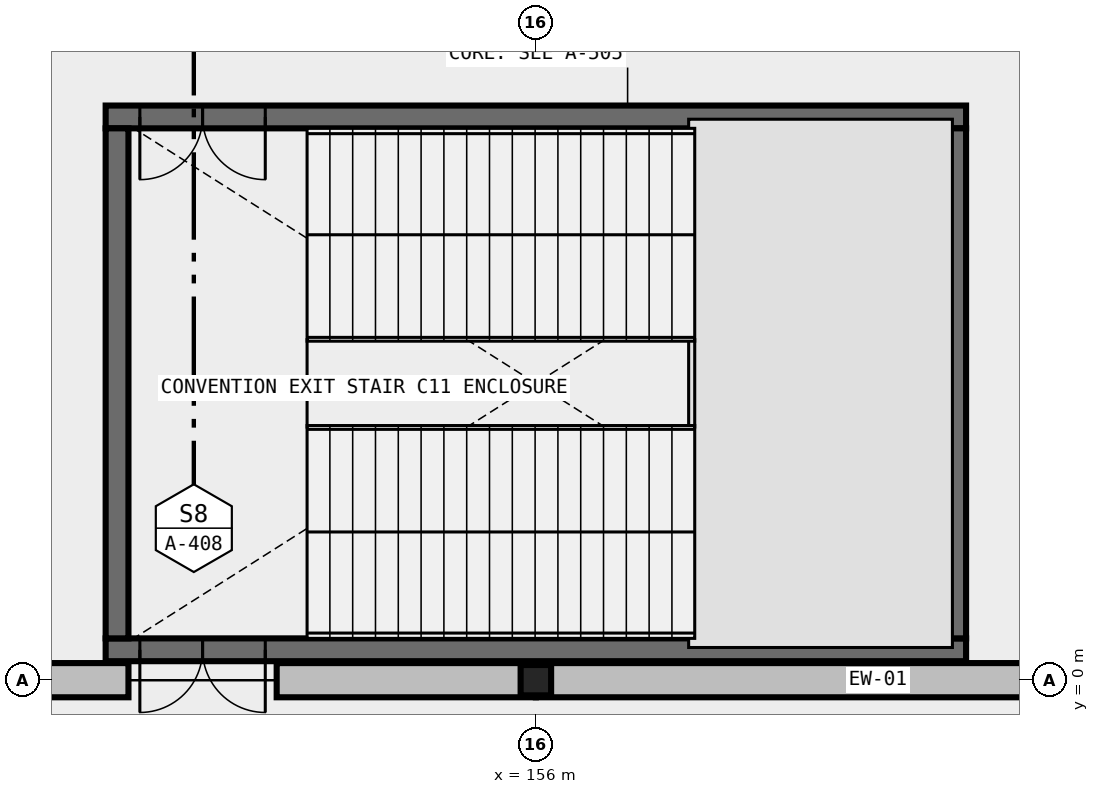
"""IFC4 building model, lengths in metres.
Left out: names, types, materials, properties, quantities, classifications, styles, units other than length and angle.
Written with IfcOpenShell. Run it as: python <this file> out.ifc"""

import sys

from ifc_helpers import new_model, si_unit, direction, frame, frame_2d, origin, origin_2d, place, context, subcontext, project, spatial, rectangle, i_section, extrude, element, fill, save


model = new_model("IFC4")
c1 = context("Model", 3, precision=1e-05, world=origin(), true_north=direction((0.0, 1.0)))
c2 = subcontext(c1, "Body", "Model", "MODEL_VIEW")
j1 = project(units=[si_unit("LENGTHUNIT", "METRE"), si_unit("PLANEANGLEUNIT", "RADIAN")], contexts=[c1])
p1 = place(None, origin())
s1 = spatial("IfcSite", under=j1, at=p1, CompositionType="ELEMENT")
p2 = place(p1, origin())
s2 = spatial("IfcBuilding", under=s1, at=p2, CompositionType="ELEMENT")
p3 = place(p2, origin())
s3 = spatial("IfcBuildingStorey", under=s2, at=p3, CompositionType="ELEMENT", Elevation=0.0)
p4 = place(p3, frame((156.0, 0.0, 0.0), z_axis=(0.0, 0.0, 1.0), x_axis=(1.0, 0.0, 0.0)))
e1 = element("IfcColumn", 1, at=p4, inside=s3, PredefinedType="COLUMN", context=c2, shape_type="SweptSolid", body=[
    extrude(i_section(OverallWidth=0.401, OverallDepth=0.399, WebThickness=0.025, FlangeThickness=0.04, FilletRadius=0.031, at=origin_2d()), origin(), (0.0, 0.0, 1.0), 6.0),
])
p5 = place(p3, frame((161.66, 0.4, 0.0), z_axis=(0.0, 0.0, 1.0), x_axis=(-1.0, 0.0, 0.0)))
e2 = element("IfcWall", 2, at=p5, inside=s3, PredefinedType="SHEAR", context=c2, shape_type="SweptSolid", body=[
    extrude(rectangle(XDim=11.32, YDim=0.3, at=frame_2d((5.66, 0.0))), origin(), (0.0, 0.0, 1.0), 6.0),
])
p6 = place(p5, frame((9.22, 0.0, 0.0)))
e3 = element("IfcOpeningElement", 3, at=p6, cuts=e2, PredefinedType="OPENING", context=c2, shape_type="SweptSolid", body=[
    extrude(rectangle(XDim=1.65, YDim=2.25, at=frame_2d((0.825, 1.125))), frame((0.0, 0.165, 0.0), z_axis=(0.0, -1.0, 0.0), x_axis=(1.0, 0.0, 0.0)), (0.0, 0.0, 1.0), 0.33),
])
p7 = place(p3, frame((161.66, 7.41, 0.0), z_axis=(0.0, 0.0, 1.0), x_axis=(-1.0, 0.0, 0.0)))
e4 = element("IfcWall", 4, at=p7, inside=s3, PredefinedType="SHEAR", context=c2, shape_type="SweptSolid", body=[
    extrude(rectangle(XDim=11.32, YDim=0.3, at=frame_2d((5.66, 0.0))), origin(), (0.0, 0.0, 1.0), 6.0),
])
p8 = place(p7, frame((9.22, 0.0, 0.0)))
e5 = element("IfcOpeningElement", 5, at=p8, cuts=e4, PredefinedType="OPENING", context=c2, shape_type="SweptSolid", body=[
    extrude(rectangle(XDim=1.65, YDim=2.25, at=frame_2d((0.825, 1.125))), frame((0.0, 0.165, 0.0), z_axis=(0.0, -1.0, 0.0), x_axis=(1.0, 0.0, 0.0)), (0.0, 0.0, 1.0), 0.33),
])
for number, where, z_axis, x_axis in (
    (6, (150.49, 7.26, 0.0), (0.0, 0.0, 1.0), (0.0, -1.0, 0.0)),
    (7, (161.51, 0.55, 0.0), (0.0, 0.0, 1.0), (0.0, 1.0, 0.0)),
):
    element("IfcWall", number, at=place(p3, frame(where, z_axis=z_axis, x_axis=x_axis)), inside=s3, PredefinedType="SHEAR", context=c2, shape_type="SweptSolid", body=[
        extrude(rectangle(XDim=6.71, YDim=0.3, at=frame_2d((3.355, 0.0))), origin(), (0.0, 0.0, 1.0), 6.0),
    ])
p9 = place(p3, frame((147.0, 0.0, 0.0), z_axis=(0.0, 0.0, 1.0), x_axis=(1.0, 0.0, 0.0)))
e8 = element("IfcWall", 8, at=p9, inside=s3, PredefinedType="STANDARD", context=c2, shape_type="SweptSolid", body=[
    extrude(rectangle(XDim=3.64, YDim=0.45, at=frame_2d((1.82, 0.0))), origin(), (0.0, 0.0, 1.0), 4.676),
])
p10 = place(p3, frame((152.59, 0.0, 0.0), z_axis=(0.0, 0.0, 1.0), x_axis=(1.0, 0.0, 0.0)))
e9 = element("IfcWall", 9, at=p10, inside=s3, PredefinedType="STANDARD", context=c2, shape_type="SweptSolid", body=[
    extrude(rectangle(XDim=3.41, YDim=0.45, at=frame_2d((1.705, 0.0))), origin(), (0.0, 0.0, 1.0), 4.676),
])
p11 = place(p3, frame((156.0, 0.0, 0.0), z_axis=(0.0, 0.0, 1.0), x_axis=(1.0, 0.0, 0.0)))
e10 = element("IfcWall", 10, at=p11, inside=s3, PredefinedType="STANDARD", context=c2, shape_type="SweptSolid", body=[
    extrude(rectangle(XDim=9.0, YDim=0.45, at=frame_2d((4.5, 0.0))), origin(), (0.0, 0.0, 1.0), 4.676),
])
p12 = place(p8, origin())
e11 = element("IfcDoor", 11, at=p12, inside=s3, OperationType="DOUBLE_DOOR_SINGLE_SWING", PredefinedType="DOOR", context=c2, shape_type="SweptSolid", body=[
    extrude(rectangle(XDim=1.65, YDim=2.25, at=frame_2d((0.825, 1.125))), frame((0.0, 0.025, 0.0), z_axis=(0.0, -1.0, 0.0), x_axis=(1.0, 0.0, 0.0)), (0.0, 0.0, 1.0), 0.05),
])
fill(e5, e11)
p13 = place(p6, origin())
e12 = element("IfcDoor", 12, at=p13, inside=s3, OperationType="DOUBLE_DOOR_SINGLE_SWING", PredefinedType="DOOR", context=c2, shape_type="SweptSolid", body=[
    extrude(rectangle(XDim=1.65, YDim=2.25, at=frame_2d((0.825, 1.125))), frame((0.0, 0.025, 0.0), z_axis=(0.0, -1.0, 0.0), x_axis=(1.0, 0.0, 0.0)), (0.0, 0.0, 1.0), 0.05),
])
fill(e3, e12)
save(model, sys.argv[1])
